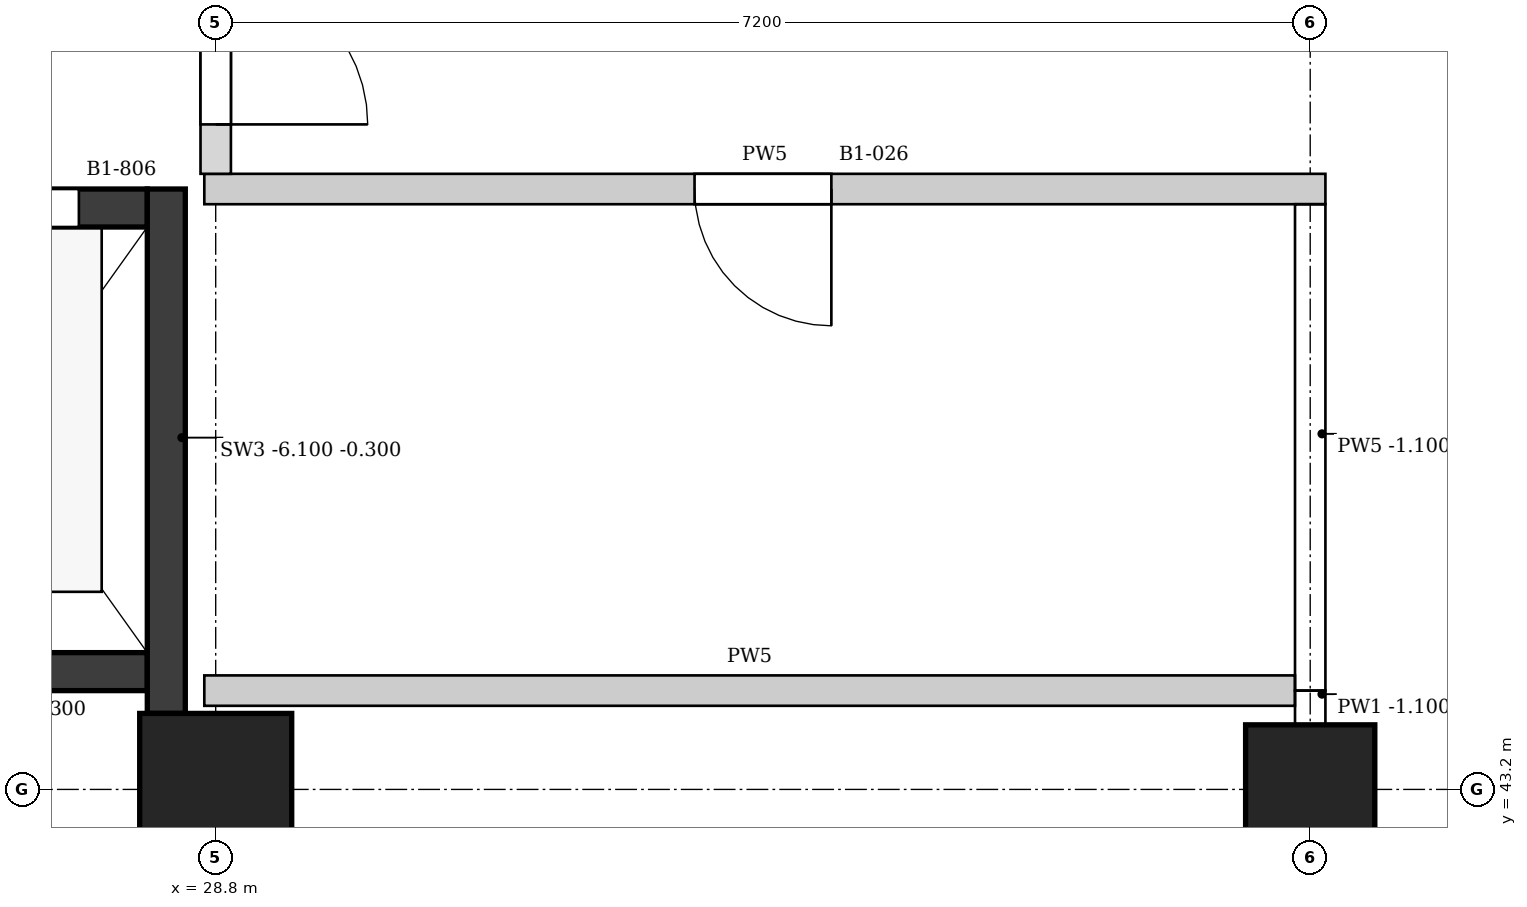
"""IFC4 building model, lengths in metres.
Left out: names, types, materials, properties, quantities, classifications, styles, units other than length and angle.
Written with IfcOpenShell. Run it as: python <this file> out.ifc"""

import sys

from ifc_helpers import new_model, si_unit, direction, frame, frame_2d, origin, origin_2d, place, context, subcontext, project, spatial, polyline, rectangle, outline, extrude, element, fill, save


model = new_model("IFC4")
c1 = context("Model", 3, precision=1e-05, world=origin(), true_north=direction((0.0, 1.0)))
c2 = subcontext(c1, "Body", "Model", "MODEL_VIEW")
j1 = project(units=[si_unit("LENGTHUNIT", "METRE"), si_unit("PLANEANGLEUNIT", "RADIAN")], contexts=[c1])
p1 = place(None, origin())
s1 = spatial("IfcSite", under=j1, at=p1, CompositionType="ELEMENT")
p2 = place(p1, origin())
s2 = spatial("IfcBuilding", under=s1, at=p2, CompositionType="ELEMENT")
p3 = place(p2, frame((0.0, 0.0, -4.5)))
s3 = spatial("IfcBuildingStorey", under=s2, at=p3, CompositionType="ELEMENT", Elevation=-4.5)
p4 = place(p3, frame((28.8, 43.2, 0.0), z_axis=(0.0, 0.0, 1.0), x_axis=(1.0, 0.0, 0.0)))
e1 = element("IfcColumn", 1, at=p4, inside=s3, PredefinedType="COLUMN", context=c2, shape_type="SweptSolid", body=[
    extrude(rectangle(XDim=1.0, YDim=1.0, at=origin_2d()), origin(), (0.0, 0.0, 1.0), 4.5),
])
p5 = place(p3, frame((36.0, 43.2, 0.0), z_axis=(0.0, 0.0, 1.0), x_axis=(1.0, 0.0, 0.0)))
e2 = element("IfcColumn", 2, at=p5, inside=s3, PredefinedType="COLUMN", context=c2, shape_type="SweptSolid", body=[
    extrude(rectangle(XDim=0.85, YDim=0.85, at=origin_2d()), origin(), (0.0, 0.0, 1.0), 4.5),
])
p6 = place(p3, frame((28.475, 43.7, -1.6), z_axis=(0.0, 0.0, 1.0), x_axis=(0.0, 1.0, 0.0)))
e3 = element("IfcWall", 3, at=p6, inside=s3, PredefinedType="SHEAR", context=c2, shape_type="SweptSolid", body=[
    extrude(rectangle(XDim=3.45, YDim=0.25, at=frame_2d((1.725, 0.0))), origin(), (0.0, 0.0, 1.0), 5.8),
])
p7 = place(p3, frame((26.35, 47.025, 0.0), z_axis=(0.0, 0.0, 1.0), x_axis=(1.0, 0.0, 0.0)))
e4 = element("IfcWall", 4, at=p7, inside=s3, PredefinedType="SHEAR", context=c2, shape_type="SweptSolid", body=[
    extrude(rectangle(XDim=2.0, YDim=0.25, at=frame_2d((1.0, 0.0))), origin(), (0.0, 0.0, 1.0), 4.2),
])
p8 = place(p7, frame((0.45, 0.0, 0.0)))
e5 = element("IfcOpeningElement", 5, at=p8, cuts=e4, PredefinedType="OPENING", context=c2, shape_type="SweptSolid", body=[
    extrude(rectangle(XDim=1.1, YDim=2.1, at=frame_2d((0.55, 1.05))), frame((0.0, 0.135, 0.0), z_axis=(0.0, -1.0, 0.0), x_axis=(1.0, 0.0, 0.0)), (0.0, 0.0, 1.0), 0.27),
])
p9 = place(p3, frame((26.35, 43.975, -1.6), z_axis=(0.0, 0.0, 1.0), x_axis=(1.0, 0.0, 0.0)))
e6 = element("IfcWall", 6, at=p9, inside=s3, PredefinedType="SHEAR", context=c2, shape_type="SweptSolid", body=[
    extrude(rectangle(XDim=2.0, YDim=0.25, at=frame_2d((1.0, 0.0))), origin(), (0.0, 0.0, 1.0), 5.8),
])
p10 = place(p3, frame((28.725, 43.85, 0.0), z_axis=(0.0, 0.0, 1.0), x_axis=(1.0, 0.0, 0.0)))
e7 = element("IfcWall", 7, at=p10, inside=s3, PredefinedType="SOLIDWALL", context=c2, shape_type="SweptSolid", body=[
    extrude(outline(polyline([(0.0, 0.0), (7.175, 0.0), (7.175, 3.4), (6.975, 3.4), (6.975, 4.2), (0.375, 4.2), (0.375, 3.4), (0.0, 3.4), (0.0, 0.0)])), frame((0.0, 0.1, 0.0), z_axis=(0.0, -1.0, 0.0), x_axis=(1.0, 0.0, 0.0)), (0.0, 0.0, 1.0), 0.2),
])
p11 = place(p3, frame((28.725, 47.15, 0.0), z_axis=(0.0, 0.0, 1.0), x_axis=(1.0, 0.0, 0.0)))
e8 = element("IfcWall", 8, at=p11, inside=s3, PredefinedType="SOLIDWALL", context=c2, shape_type="SweptSolid", body=[
    extrude(outline(polyline([(0.0, 0.0), (7.375, 0.0), (7.375, 3.4), (6.975, 3.4), (6.975, 4.2), (0.375, 4.2), (0.375, 3.4), (0.0, 3.4), (0.0, 0.0)])), frame((0.0, 0.1, 0.0), z_axis=(0.0, -1.0, 0.0), x_axis=(1.0, 0.0, 0.0)), (0.0, 0.0, 1.0), 0.2),
])
p12 = place(p11, frame((3.225, 0.0, 0.0)))
e9 = element("IfcOpeningElement", 9, at=p12, cuts=e8, PredefinedType="OPENING", context=c2, shape_type="SweptSolid", body=[
    extrude(rectangle(XDim=0.9, YDim=2.1, at=frame_2d((0.45, 1.05))), frame((0.0, 0.11, 0.0), z_axis=(0.0, -1.0, 0.0), x_axis=(1.0, 0.0, 0.0)), (0.0, 0.0, 1.0), 0.22),
])
p13 = place(p3, frame((28.8, 47.25, 0.0), z_axis=(0.0, 0.0, 1.0), x_axis=(0.0, 1.0, 0.0)))
e10 = element("IfcWall", 10, at=p13, inside=s3, PredefinedType="PARTITIONING", context=c2, shape_type="SweptSolid", body=[
    extrude(rectangle(XDim=2.65, YDim=0.2, at=frame_2d((1.325, 0.0))), origin(), (0.0, 0.0, 1.0), 3.4),
])
p14 = place(p13, frame((0.325, 0.0, 0.0)))
e11 = element("IfcOpeningElement", 11, at=p14, cuts=e10, PredefinedType="OPENING", context=c2, shape_type="SweptSolid", body=[
    extrude(rectangle(XDim=2.0, YDim=2.4, at=frame_2d((1.0, 1.2))), frame((0.0, 0.11, 0.0), z_axis=(0.0, -1.0, 0.0), x_axis=(1.0, 0.0, 0.0)), (0.0, 0.0, 1.0), 0.22),
])
p15 = place(p3, frame((36.0, 43.625, 0.0), z_axis=(0.0, 0.0, 1.0), x_axis=(0.0, 1.0, 0.0)))
e12 = element("IfcWall", 12, at=p15, inside=s3, PredefinedType="PARTITIONING", context=c2, shape_type="SweptSolid", body=[
    extrude(rectangle(XDim=0.225, YDim=0.2, at=frame_2d((0.113, 0.0))), origin(), (0.0, 0.0, 1.0), 3.4),
])
p16 = place(p3, frame((36.0, 43.85, 0.0), z_axis=(0.0, 0.0, 1.0), x_axis=(0.0, 1.0, 0.0)))
e13 = element("IfcWall", 13, at=p16, inside=s3, PredefinedType="SOLIDWALL", context=c2, shape_type="SweptSolid", body=[
    extrude(rectangle(XDim=3.2, YDim=0.2, at=frame_2d((1.6, 0.0))), origin(), (0.0, 0.0, 1.0), 3.4),
])
p17 = place(p8, origin())
e14 = element("IfcDoor", 14, at=p17, inside=s3, OperationType="SLIDING_TO_LEFT", PredefinedType="DOOR", context=c2, shape_type="SweptSolid", body=[
    extrude(rectangle(XDim=1.1, YDim=2.1, at=frame_2d((0.55, 1.05))), frame((0.0, 0.025, 0.0), z_axis=(0.0, -1.0, 0.0), x_axis=(1.0, 0.0, 0.0)), (0.0, 0.0, 1.0), 0.05),
])
fill(e5, e14)
p18 = place(p14, origin())
e15 = element("IfcDoor", 15, at=p18, inside=s3, OperationType="DOUBLE_DOOR_SINGLE_SWING", PredefinedType="DOOR", context=c2, shape_type="SweptSolid", body=[
    extrude(rectangle(XDim=2.0, YDim=2.4, at=frame_2d((1.0, 1.2))), frame((0.0, 0.025, 0.0), z_axis=(0.0, -1.0, 0.0), x_axis=(1.0, 0.0, 0.0)), (0.0, 0.0, 1.0), 0.05),
])
fill(e11, e15)
p19 = place(p12, frame((0.9, 0.0, 0.0), z_axis=(0.0, 0.0, 1.0), x_axis=(-1.0, 0.0, 0.0)))
e16 = element("IfcDoor", 16, at=p19, inside=s3, OperationType="SINGLE_SWING_LEFT", PredefinedType="DOOR", context=c2, shape_type="SweptSolid", body=[
    extrude(rectangle(XDim=0.9, YDim=2.1, at=frame_2d((0.45, 1.05))), frame((0.0, 0.025, 0.0), z_axis=(0.0, -1.0, 0.0), x_axis=(1.0, 0.0, 0.0)), (0.0, 0.0, 1.0), 0.05),
])
fill(e9, e16)
save(model, sys.argv[1])
